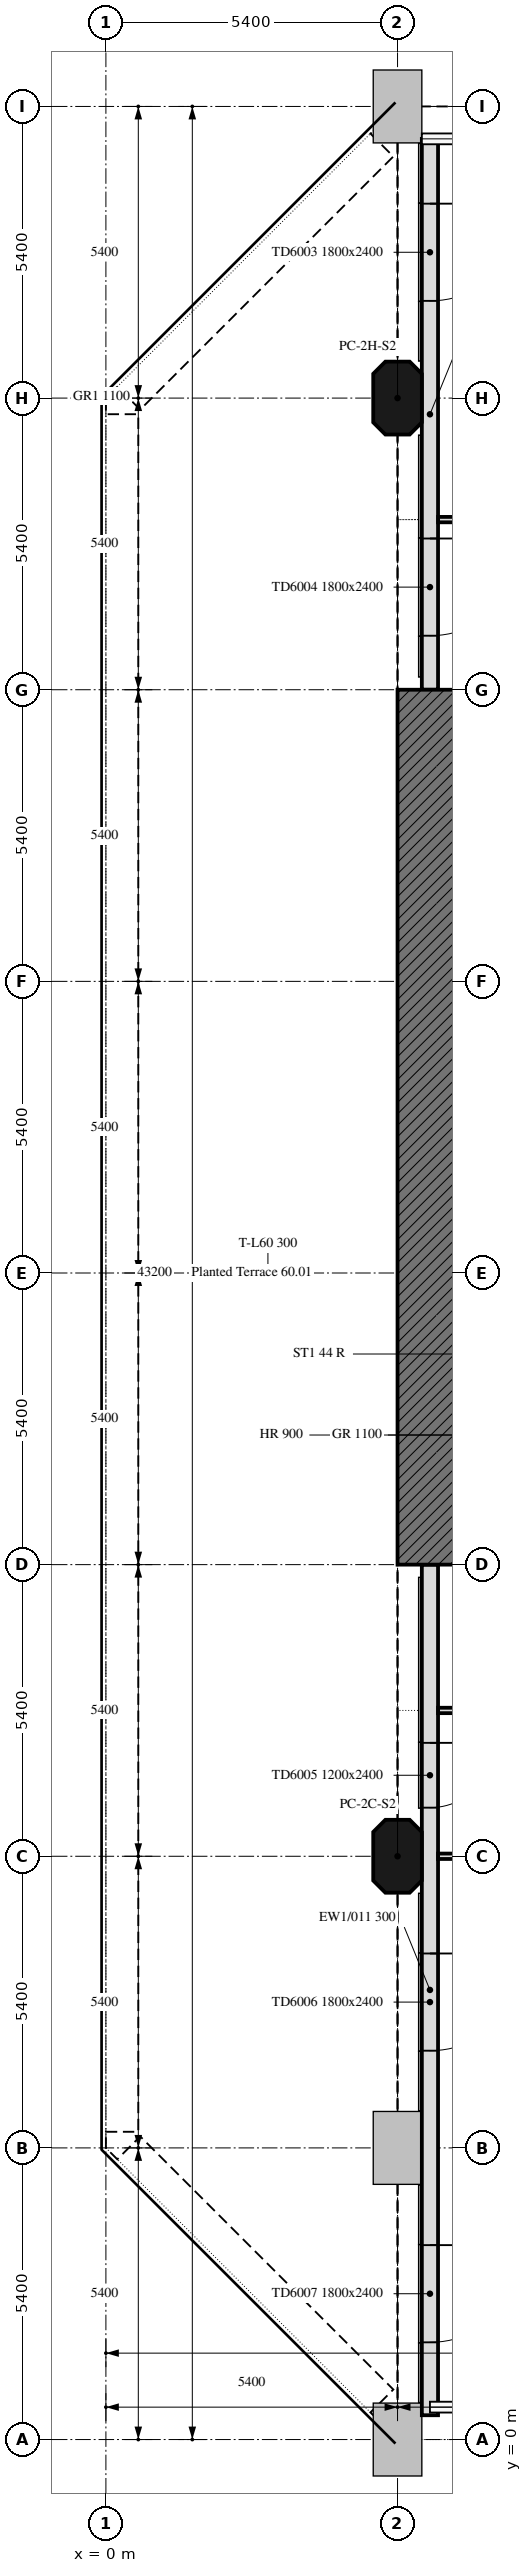
"""IFC4 building model, lengths in metres.
Left out: names, types, materials, properties, quantities, classifications, styles, units other than length and angle.
Written with IfcOpenShell. Run it as: python <this file> out.ifc"""

import sys

from ifc_helpers import new_model, si_unit, direction, frame, frame_2d, origin, place, context, subcontext, project, spatial, polyline, rectangle, outline, extrude, element, fill, save


model = new_model("IFC4")
c1 = context("Model", 3, precision=1e-05, world=origin(), true_north=direction((0.0, 1.0)))
c2 = subcontext(c1, "Body", "Model", "MODEL_VIEW")
j1 = project(units=[si_unit("LENGTHUNIT", "METRE"), si_unit("PLANEANGLEUNIT", "RADIAN")], contexts=[c1])
p1 = place(None, origin())
s1 = spatial("IfcSite", under=j1, at=p1, CompositionType="ELEMENT")
p2 = place(p1, origin())
s2 = spatial("IfcBuilding", under=s1, at=p2, CompositionType="ELEMENT")
p3 = place(p2, frame((0.0, 0.0, 243.1)))
s3 = spatial("IfcBuildingStorey", under=s2, at=p3, CompositionType="ELEMENT", Elevation=243.1)
for number, where, z_axis, x_axis in (
    (1, (5.4, 10.8, 0.0), (0.0, 0.0, 1.0), (0.0, 1.0, 0.0)),
    (2, (5.4, 37.8, 0.0), (0.0, 0.0, 1.0), (0.0, 1.0, 0.0)),
):
    element("IfcColumn", number, at=place(p3, frame(where, z_axis=z_axis, x_axis=x_axis)), inside=s3, PredefinedType="COLUMN", context=c2, shape_type="SweptSolid", body=[
        extrude(outline(polyline([(-0.45, -0.45), (0.45, -0.45), (0.675, -0.225), (0.675, 0.225), (0.45, 0.45), (-0.45, 0.45), (-0.675, 0.225), (-0.675, -0.225), (-0.45, -0.45)])), origin(), (0.0, 0.0, 1.0), 7.5),
    ])
p4 = place(p3, frame((6.0, 42.6, 0.0), z_axis=(0.0, 0.0, 1.0), x_axis=(0.0, -1.0, 0.0)))
e3 = element("IfcWall", 3, at=p4, inside=s3, PredefinedType="SOLIDWALL", context=c2, shape_type="SweptSolid", body=[
    extrude(rectangle(XDim=10.2, YDim=0.3, at=frame_2d((5.1, 0.0))), origin(), (0.0, 0.0, 1.0), 7.5),
])
p5 = place(p4, frame((1.2, 0.0, 0.0)))
e4 = element("IfcOpeningElement", 4, at=p5, cuts=e3, PredefinedType="OPENING", context=c2, shape_type="SweptSolid", body=[
    extrude(rectangle(XDim=1.8, YDim=2.4, at=frame_2d((0.9, 1.2))), frame((0.0, 0.16, 0.0), z_axis=(0.0, -1.0, 0.0), x_axis=(1.0, 0.0, 0.0)), (0.0, 0.0, 1.0), 0.32),
])
p6 = place(p4, frame((7.4, 0.0, 0.0)))
e5 = element("IfcOpeningElement", 5, at=p6, cuts=e3, PredefinedType="OPENING", context=c2, shape_type="SweptSolid", body=[
    extrude(rectangle(XDim=1.8, YDim=2.4, at=frame_2d((0.9, 1.2))), frame((0.0, 0.16, 0.0), z_axis=(0.0, -1.0, 0.0), x_axis=(1.0, 0.0, 0.0)), (0.0, 0.0, 1.0), 0.32),
])
p7 = place(p3, frame((6.0, 16.2, 0.0), z_axis=(0.0, 0.0, 1.0), x_axis=(0.0, -1.0, 0.0)))
e6 = element("IfcWall", 6, at=p7, inside=s3, PredefinedType="SOLIDWALL", context=c2, shape_type="SweptSolid", body=[
    extrude(rectangle(XDim=15.75, YDim=0.3, at=frame_2d((7.875, 0.0))), origin(), (0.0, 0.0, 1.0), 7.5),
])
p8 = place(p7, frame((3.3, 0.0, 0.0)))
e7 = element("IfcOpeningElement", 7, at=p8, cuts=e6, PredefinedType="OPENING", context=c2, shape_type="SweptSolid", body=[
    extrude(rectangle(XDim=1.2, YDim=2.4, at=frame_2d((0.6, 1.2))), frame((0.0, 0.16, 0.0), z_axis=(0.0, -1.0, 0.0), x_axis=(1.0, 0.0, 0.0)), (0.0, 0.0, 1.0), 0.32),
])
p9 = place(p7, frame((7.2, 0.0, 0.0)))
e8 = element("IfcOpeningElement", 8, at=p9, cuts=e6, PredefinedType="OPENING", context=c2, shape_type="SweptSolid", body=[
    extrude(rectangle(XDim=1.8, YDim=2.4, at=frame_2d((0.9, 1.2))), frame((0.0, 0.16, 0.0), z_axis=(0.0, -1.0, 0.0), x_axis=(1.0, 0.0, 0.0)), (0.0, 0.0, 1.0), 0.32),
])
p10 = place(p7, frame((12.6, 0.0, 0.0)))
e9 = element("IfcOpeningElement", 9, at=p10, cuts=e6, PredefinedType="OPENING", context=c2, shape_type="SweptSolid", body=[
    extrude(rectangle(XDim=1.8, YDim=2.4, at=frame_2d((0.9, 1.2))), frame((0.0, 0.16, 0.0), z_axis=(0.0, -1.0, 0.0), x_axis=(1.0, 0.0, 0.0)), (0.0, 0.0, 1.0), 0.32),
])
p11 = place(p3, frame((6.0, 16.2, 0.0), z_axis=(0.0, 0.0, 1.0), x_axis=(0.0, 1.0, 0.0)))
e10 = element("IfcWall", 10, at=p11, inside=s3, PredefinedType="SOLIDWALL", context=c2, shape_type="SweptSolid", body=[
    extrude(rectangle(XDim=16.2, YDim=1.2, at=frame_2d((8.1, 0.0))), origin(), (0.0, 0.0, 1.0), 7.5),
])
p12 = place(p3, frame((6.151, 35.55, 0.0), z_axis=(0.0, 0.0, 1.0), x_axis=(1.0, 0.0, 0.0)))
e11 = element("IfcWall", 11, at=p12, inside=s3, PredefinedType="PARTITIONING", context=c2, shape_type="SweptSolid", body=[
    extrude(rectangle(XDim=36.298, YDim=0.1, at=frame_2d((18.149, 0.0))), origin(), (0.0, 0.0, 1.0), 7.5),
])
p13 = place(p12, frame((28.649, 0.0, 0.0)))
e12 = element("IfcOpeningElement", 12, at=p13, cuts=e11, PredefinedType="OPENING", context=c2, shape_type="SweptSolid", body=[
    extrude(rectangle(XDim=1.8, YDim=2.4, at=frame_2d((0.9, 1.2))), frame((0.0, 0.05, 0.0), z_axis=(0.0, -1.0, 0.0), x_axis=(1.0, 0.0, 0.0)), (0.0, 0.0, 1.0), 0.1),
])
p14 = place(p12, frame((17.249, 0.0, 0.0)))
e13 = element("IfcOpeningElement", 13, at=p14, cuts=e11, PredefinedType="OPENING", context=c2, shape_type="SweptSolid", body=[
    extrude(rectangle(XDim=1.8, YDim=2.4, at=frame_2d((0.9, 1.2))), frame((0.0, 0.05, 0.0), z_axis=(0.0, -1.0, 0.0), x_axis=(1.0, 0.0, 0.0)), (0.0, 0.0, 1.0), 0.1),
])
p15 = place(p12, frame((1.649, 0.0, 0.0)))
e14 = element("IfcOpeningElement", 14, at=p15, cuts=e11, PredefinedType="OPENING", context=c2, shape_type="SweptSolid", body=[
    extrude(rectangle(XDim=1.8, YDim=2.4, at=frame_2d((0.9, 1.2))), frame((0.0, 0.05, 0.0), z_axis=(0.0, -1.0, 0.0), x_axis=(1.0, 0.0, 0.0)), (0.0, 0.0, 1.0), 0.1),
])
p16 = place(p3, frame((10.43, 10.8, 0.0), z_axis=(0.0, 0.0, 1.0), x_axis=(-1.0, 0.0, 0.0)))
e15 = element("IfcWall", 15, at=p16, inside=s3, PredefinedType="PARTITIONING", context=c2, shape_type="SweptSolid", body=[
    extrude(rectangle(XDim=4.279, YDim=0.1, at=frame_2d((2.14, 0.0))), origin(), (0.0, 0.0, 1.0), 7.5),
])
p17 = place(p16, frame((1.43, 0.0, 0.0)))
e16 = element("IfcOpeningElement", 16, at=p17, cuts=e15, PredefinedType="OPENING", context=c2, shape_type="SweptSolid", body=[
    extrude(rectangle(XDim=1.8, YDim=2.4, at=frame_2d((0.9, 1.2))), frame((0.0, 0.05, 0.0), z_axis=(0.0, -1.0, 0.0), x_axis=(1.0, 0.0, 0.0)), (0.0, 0.0, 1.0), 0.1),
])
p18 = place(p3, frame((6.151, 13.5, 0.0), z_axis=(0.0, 0.0, 1.0), x_axis=(1.0, 0.0, 0.0)))
e17 = element("IfcWall", 17, at=p18, inside=s3, PredefinedType="PARTITIONING", context=c2, shape_type="SweptSolid", body=[
    extrude(rectangle(XDim=10.099, YDim=0.1, at=frame_2d((5.05, 0.0))), origin(), (0.0, 0.0, 1.0), 6.75),
])
p19 = place(p18, frame((1.349, 0.0, 0.0)))
e18 = element("IfcOpeningElement", 18, at=p19, cuts=e17, PredefinedType="OPENING", context=c2, shape_type="SweptSolid", body=[
    extrude(rectangle(XDim=1.8, YDim=2.4, at=frame_2d((0.9, 1.2))), frame((0.0, 0.05, 0.0), z_axis=(0.0, -1.0, 0.0), x_axis=(1.0, 0.0, 0.0)), (0.0, 0.0, 1.0), 0.1),
])
p20 = place(p5, origin())
e19 = element("IfcDoor", 19, at=p20, inside=s3, OperationType="DOUBLE_DOOR_DOUBLE_SWING", PredefinedType="DOOR", context=c2, shape_type="SweptSolid", body=[
    extrude(rectangle(XDim=1.8, YDim=2.4, at=frame_2d((0.9, 1.2))), frame((0.0, 0.025, 0.0), z_axis=(0.0, -1.0, 0.0), x_axis=(1.0, 0.0, 0.0)), (0.0, 0.0, 1.0), 0.05),
])
fill(e4, e19)
p21 = place(p6, origin())
e20 = element("IfcDoor", 20, at=p21, inside=s3, OperationType="DOUBLE_DOOR_DOUBLE_SWING", PredefinedType="DOOR", context=c2, shape_type="SweptSolid", body=[
    extrude(rectangle(XDim=1.8, YDim=2.4, at=frame_2d((0.9, 1.2))), frame((0.0, 0.025, 0.0), z_axis=(0.0, -1.0, 0.0), x_axis=(1.0, 0.0, 0.0)), (0.0, 0.0, 1.0), 0.05),
])
fill(e5, e20)
p22 = place(p8, origin())
e21 = element("IfcDoor", 21, at=p22, inside=s3, OperationType="SINGLE_SWING_LEFT", PredefinedType="DOOR", context=c2, shape_type="SweptSolid", body=[
    extrude(rectangle(XDim=1.2, YDim=2.4, at=frame_2d((0.6, 1.2))), frame((0.0, 0.025, 0.0), z_axis=(0.0, -1.0, 0.0), x_axis=(1.0, 0.0, 0.0)), (0.0, 0.0, 1.0), 0.05),
])
fill(e7, e21)
p23 = place(p9, origin())
e22 = element("IfcDoor", 22, at=p23, inside=s3, OperationType="DOUBLE_DOOR_DOUBLE_SWING", PredefinedType="DOOR", context=c2, shape_type="SweptSolid", body=[
    extrude(rectangle(XDim=1.8, YDim=2.4, at=frame_2d((0.9, 1.2))), frame((0.0, 0.025, 0.0), z_axis=(0.0, -1.0, 0.0), x_axis=(1.0, 0.0, 0.0)), (0.0, 0.0, 1.0), 0.05),
])
fill(e8, e22)
p24 = place(p10, origin())
e23 = element("IfcDoor", 23, at=p24, inside=s3, OperationType="DOUBLE_DOOR_DOUBLE_SWING", PredefinedType="DOOR", context=c2, shape_type="SweptSolid", body=[
    extrude(rectangle(XDim=1.8, YDim=2.4, at=frame_2d((0.9, 1.2))), frame((0.0, 0.025, 0.0), z_axis=(0.0, -1.0, 0.0), x_axis=(1.0, 0.0, 0.0)), (0.0, 0.0, 1.0), 0.05),
])
fill(e9, e23)
save(model, sys.argv[1])
